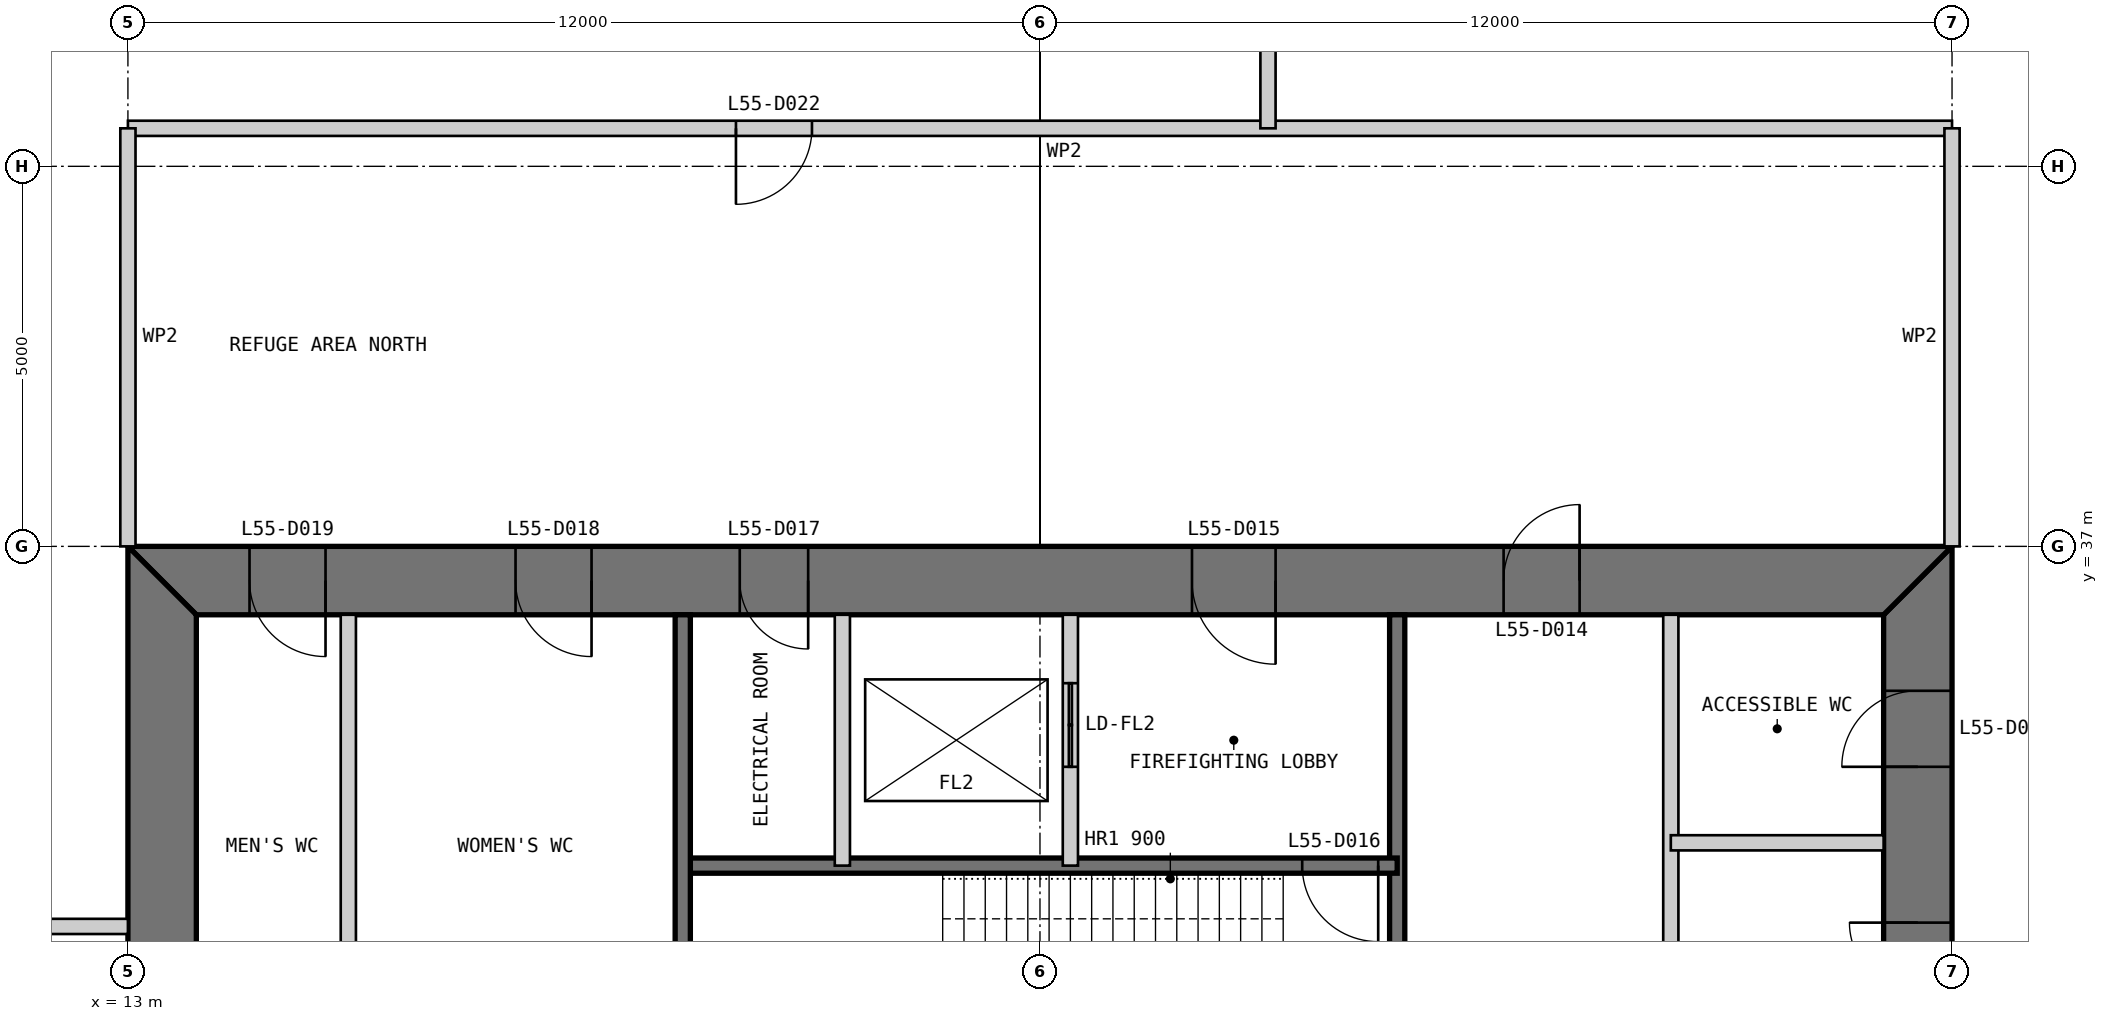
"""IFC4 building model, lengths in metres.
Left out: names, types, materials, properties, quantities, classifications, styles, units other than length and angle.
Written with IfcOpenShell. Run it as: python <this file> out.ifc"""

import sys

from ifc_helpers import new_model, si_unit, direction, frame, frame_2d, origin, place, context, subcontext, project, spatial, polyline, rectangle, outline, extrude, element, fill, save


model = new_model("IFC4")
c1 = context("Model", 3, precision=1e-05, world=origin(), true_north=direction((0.0, 1.0)))
c2 = subcontext(c1, "Body", "Model", "MODEL_VIEW")
j1 = project(units=[si_unit("LENGTHUNIT", "METRE"), si_unit("PLANEANGLEUNIT", "RADIAN")], contexts=[c1])
p1 = place(None, origin())
s1 = spatial("IfcSite", under=j1, at=p1, CompositionType="ELEMENT")
p2 = place(p1, origin())
s2 = spatial("IfcBuilding", under=s1, at=p2, CompositionType="ELEMENT")
p3 = place(p2, frame((0.0, 0.0, 233.8)))
s3 = spatial("IfcBuildingStorey", under=s2, at=p3, CompositionType="ELEMENT", Elevation=233.8)
p4 = place(p3, frame((36.55, 13.9, 0.0), z_axis=(0.0, 0.0, 1.0), x_axis=(0.0, 1.0, 0.0)))
e1 = element("IfcWall", 1, at=p4, inside=s3, PredefinedType="SHEAR", context=c2, shape_type="SweptSolid", body=[
    extrude(outline(polyline([(-0.9, -0.45), (23.1, -0.45), (22.2, 0.45), (0.0, 0.45), (-0.9, -0.45)])), origin(), (0.0, 0.0, 1.0), 6.0),
])
p5 = place(p4, frame((20.2, 0.0, 0.0)))
e2 = element("IfcOpeningElement", 2, at=p5, cuts=e1, PredefinedType="OPENING", context=c2, shape_type="SweptSolid", body=[
    extrude(rectangle(XDim=1.0, YDim=2.2, at=frame_2d((0.5, 1.1))), frame((0.0, 0.46, 0.0), z_axis=(0.0, -1.0, 0.0), x_axis=(1.0, 0.0, 0.0)), (0.0, 0.0, 1.0), 0.92),
])
p6 = place(p4, frame((17.25, 0.0, 0.0)))
e3 = element("IfcOpeningElement", 3, at=p6, cuts=e1, PredefinedType="OPENING", context=c2, shape_type="SweptSolid", body=[
    extrude(rectangle(XDim=0.9, YDim=2.2, at=frame_2d((0.45, 1.1))), frame((0.0, 0.46, 0.0), z_axis=(0.0, -1.0, 0.0), x_axis=(1.0, 0.0, 0.0)), (0.0, 0.0, 1.0), 0.92),
])
p7 = place(p3, frame((37.0, 36.55, 0.0), z_axis=(0.0, 0.0, 1.0), x_axis=(-1.0, 0.0, 0.0)))
e4 = element("IfcWall", 4, at=p7, inside=s3, PredefinedType="SHEAR", context=c2, shape_type="SweptSolid", body=[
    extrude(outline(polyline([(0.0, -0.45), (24.0, -0.45), (23.1, 0.45), (0.9, 0.45), (0.0, -0.45)])), origin(), (0.0, 0.0, 1.0), 6.0),
])
p8 = place(p7, frame((4.9, 0.0, 0.0)))
e5 = element("IfcOpeningElement", 5, at=p8, cuts=e4, PredefinedType="OPENING", context=c2, shape_type="SweptSolid", body=[
    extrude(rectangle(XDim=1.0, YDim=2.2, at=frame_2d((0.5, 1.1))), frame((0.0, 0.46, 0.0), z_axis=(0.0, -1.0, 0.0), x_axis=(1.0, 0.0, 0.0)), (0.0, 0.0, 1.0), 0.92),
])
p9 = place(p7, frame((8.9, 0.0, 0.0)))
e6 = element("IfcOpeningElement", 6, at=p9, cuts=e4, PredefinedType="OPENING", context=c2, shape_type="SweptSolid", body=[
    extrude(rectangle(XDim=1.1, YDim=2.2, at=frame_2d((0.55, 1.1))), frame((0.0, 0.46, 0.0), z_axis=(0.0, -1.0, 0.0), x_axis=(1.0, 0.0, 0.0)), (0.0, 0.0, 1.0), 0.92),
])
p10 = place(p7, frame((15.05, 0.0, 0.0)))
e7 = element("IfcOpeningElement", 7, at=p10, cuts=e4, PredefinedType="OPENING", context=c2, shape_type="SweptSolid", body=[
    extrude(rectangle(XDim=0.9, YDim=2.2, at=frame_2d((0.45, 1.1))), frame((0.0, 0.46, 0.0), z_axis=(0.0, -1.0, 0.0), x_axis=(1.0, 0.0, 0.0)), (0.0, 0.0, 1.0), 0.92),
])
p11 = place(p7, frame((17.9, 0.0, 0.0)))
e8 = element("IfcOpeningElement", 8, at=p11, cuts=e4, PredefinedType="OPENING", context=c2, shape_type="SweptSolid", body=[
    extrude(rectangle(XDim=1.0, YDim=2.2, at=frame_2d((0.5, 1.1))), frame((0.0, 0.46, 0.0), z_axis=(0.0, -1.0, 0.0), x_axis=(1.0, 0.0, 0.0)), (0.0, 0.0, 1.0), 0.92),
])
p12 = place(p7, frame((21.4, 0.0, 0.0)))
e9 = element("IfcOpeningElement", 9, at=p12, cuts=e4, PredefinedType="OPENING", context=c2, shape_type="SweptSolid", body=[
    extrude(rectangle(XDim=1.0, YDim=2.2, at=frame_2d((0.5, 1.1))), frame((0.0, 0.46, 0.0), z_axis=(0.0, -1.0, 0.0), x_axis=(1.0, 0.0, 0.0)), (0.0, 0.0, 1.0), 0.92),
])
p13 = place(p3, frame((13.45, 36.1, 0.0), z_axis=(0.0, 0.0, 1.0), x_axis=(0.0, -1.0, 0.0)))
e10 = element("IfcWall", 10, at=p13, inside=s3, PredefinedType="SHEAR", context=c2, shape_type="SweptSolid", body=[
    extrude(outline(polyline([(-0.9, -0.45), (23.1, -0.45), (22.2, 0.45), (0.0, 0.45), (-0.9, -0.45)])), origin(), (0.0, 0.0, 1.0), 6.0),
])
p14 = place(p13, frame((20.2, 0.0, 0.0)))
e11 = element("IfcOpeningElement", 11, at=p14, cuts=e10, PredefinedType="OPENING", context=c2, shape_type="SweptSolid", body=[
    extrude(rectangle(XDim=1.0, YDim=2.2, at=frame_2d((0.5, 1.1))), frame((0.0, 0.46, 0.0), z_axis=(0.0, -1.0, 0.0), x_axis=(1.0, 0.0, 0.0)), (0.0, 0.0, 1.0), 0.92),
])
p15 = place(p13, frame((17.25, 0.0, 0.0)))
e12 = element("IfcOpeningElement", 12, at=p15, cuts=e10, PredefinedType="OPENING", context=c2, shape_type="SweptSolid", body=[
    extrude(rectangle(XDim=0.9, YDim=2.2, at=frame_2d((0.45, 1.1))), frame((0.0, 0.46, 0.0), z_axis=(0.0, -1.0, 0.0), x_axis=(1.0, 0.0, 0.0)), (0.0, 0.0, 1.0), 0.92),
])
p16 = place(p3, frame((33.3, 36.1, 0.0), z_axis=(0.0, 0.0, 1.0), x_axis=(0.0, -1.0, 0.0)))
e13 = element("IfcWall", 13, at=p16, inside=s3, PredefinedType="PARTITIONING", context=c2, shape_type="SweptSolid", body=[
    extrude(rectangle(XDim=16.1, YDim=0.2, at=frame_2d((8.05, 0.0))), origin(), (0.0, 0.0, 1.0), 5.8),
])
p17 = place(p3, frame((29.7, 36.1, 0.0), z_axis=(0.0, 0.0, 1.0), x_axis=(0.0, -1.0, 0.0)))
e14 = element("IfcWall", 14, at=p17, inside=s3, PredefinedType="SOLIDWALL", context=c2, shape_type="SweptSolid", body=[
    extrude(rectangle(XDim=16.1, YDim=0.2, at=frame_2d((8.05, 0.0))), origin(), (0.0, 0.0, 1.0), 5.8),
])
p18 = place(p3, frame((29.7, 32.8, 0.0), z_axis=(0.0, 0.0, 1.0), x_axis=(-1.0, 0.0, 0.0)))
e15 = element("IfcWall", 15, at=p18, inside=s3, PredefinedType="SOLIDWALL", context=c2, shape_type="SweptSolid", body=[
    extrude(rectangle(XDim=9.4, YDim=0.2, at=frame_2d((4.7, 0.0))), origin(), (0.0, 0.0, 1.0), 5.8),
])
p19 = place(p18, frame((0.25, 0.0, 0.0)))
e16 = element("IfcOpeningElement", 16, at=p19, cuts=e15, PredefinedType="OPENING", context=c2, shape_type="SweptSolid", body=[
    extrude(rectangle(XDim=1.0, YDim=2.2, at=frame_2d((0.5, 1.1))), frame((0.0, 0.11, 0.0), z_axis=(0.0, -1.0, 0.0), x_axis=(1.0, 0.0, 0.0)), (0.0, 0.0, 1.0), 0.22),
])
p20 = place(p3, frame((25.4, 36.1, 0.0), z_axis=(0.0, 0.0, 1.0), x_axis=(0.0, -1.0, 0.0)))
e17 = element("IfcWall", 17, at=p20, inside=s3, PredefinedType="PARTITIONING", context=c2, shape_type="SweptSolid", body=[
    extrude(rectangle(XDim=3.3, YDim=0.2, at=frame_2d((1.65, 0.0))), origin(), (0.0, 0.0, 1.0), 5.8),
])
p21 = place(p20, frame((0.9, 0.0, 0.0)))
e18 = element("IfcOpeningElement", 18, at=p21, cuts=e17, PredefinedType="OPENING", context=c2, shape_type="SweptSolid", body=[
    extrude(rectangle(XDim=1.1, YDim=2.2, at=frame_2d((0.55, 1.1))), frame((0.0, 0.11, 0.0), z_axis=(0.0, -1.0, 0.0), x_axis=(1.0, 0.0, 0.0)), (0.0, 0.0, 1.0), 0.22),
])
p22 = place(p3, frame((22.4, 36.1, 0.0), z_axis=(0.0, 0.0, 1.0), x_axis=(0.0, -1.0, 0.0)))
e19 = element("IfcWall", 19, at=p22, inside=s3, PredefinedType="PARTITIONING", context=c2, shape_type="SweptSolid", body=[
    extrude(rectangle(XDim=3.3, YDim=0.2, at=frame_2d((1.65, 0.0))), origin(), (0.0, 0.0, 1.0), 5.8),
])
p23 = place(p3, frame((20.3, 36.1, 0.0), z_axis=(0.0, 0.0, 1.0), x_axis=(0.0, -1.0, 0.0)))
e20 = element("IfcWall", 20, at=p23, inside=s3, PredefinedType="SOLIDWALL", context=c2, shape_type="SweptSolid", body=[
    extrude(rectangle(XDim=6.1, YDim=0.2, at=frame_2d((3.05, 0.0))), origin(), (0.0, 0.0, 1.0), 5.8),
])
p24 = place(p3, frame((15.9, 36.1, 0.0), z_axis=(0.0, 0.0, 1.0), x_axis=(0.0, -1.0, 0.0)))
e21 = element("IfcWall", 21, at=p24, inside=s3, PredefinedType="PARTITIONING", context=c2, shape_type="SweptSolid", body=[
    extrude(rectangle(XDim=6.1, YDim=0.2, at=frame_2d((3.05, 0.0))), origin(), (0.0, 0.0, 1.0), 5.8),
])
p25 = place(p3, frame((36.1, 33.1, 0.0), z_axis=(0.0, 0.0, 1.0), x_axis=(-1.0, 0.0, 0.0)))
e22 = element("IfcWall", 22, at=p25, inside=s3, PredefinedType="PARTITIONING", context=c2, shape_type="SweptSolid", body=[
    extrude(rectangle(XDim=2.8, YDim=0.2, at=frame_2d((1.4, 0.0))), origin(), (0.0, 0.0, 1.0), 5.8),
])
p26 = place(p3, frame((13.0, 42.5, 0.0), z_axis=(0.0, 0.0, 1.0), x_axis=(1.0, 0.0, 0.0)))
e23 = element("IfcWall", 23, at=p26, inside=s3, PredefinedType="PARTITIONING", context=c2, shape_type="SweptSolid", body=[
    extrude(rectangle(XDim=24.0, YDim=0.2, at=frame_2d((12.0, 0.0))), origin(), (0.0, 0.0, 1.0), 5.8),
])
p27 = place(p26, frame((8.0, 0.0, 0.0)))
e24 = element("IfcOpeningElement", 24, at=p27, cuts=e23, PredefinedType="OPENING", context=c2, shape_type="SweptSolid", body=[
    extrude(rectangle(XDim=1.0, YDim=2.2, at=frame_2d((0.5, 1.1))), frame((0.0, 0.11, 0.0), z_axis=(0.0, -1.0, 0.0), x_axis=(1.0, 0.0, 0.0)), (0.0, 0.0, 1.0), 0.22),
])
for number, where, z_axis, x_axis in (
    (25, (37.0, 42.5, 0.0), (0.0, 0.0, 1.0), (0.0, -1.0, 0.0)),
    (26, (13.0, 37.0, 0.0), (0.0, 0.0, 1.0), (0.0, 1.0, 0.0)),
):
    element("IfcWall", number, at=place(p3, frame(where, z_axis=z_axis, x_axis=x_axis)), inside=s3, PredefinedType="PARTITIONING", context=c2, shape_type="SweptSolid", body=[
        extrude(rectangle(XDim=5.5, YDim=0.2, at=frame_2d((2.75, 0.0))), origin(), (0.0, 0.0, 1.0), 4.705),
    ])
p28 = place(p3, frame((28.0, 42.5, 0.0), z_axis=(0.0, 0.0, 1.0), x_axis=(0.0, 1.0, 0.0)))
e27 = element("IfcWall", 27, at=p28, inside=s3, PredefinedType="PARTITIONING", context=c2, shape_type="SweptSolid", body=[
    extrude(rectangle(XDim=5.5, YDim=0.2, at=frame_2d((2.75, 0.0))), origin(), (0.0, 0.0, 1.0), 4.954),
])
p29 = place(p28, frame((1.85, 0.0, 0.0)))
e28 = element("IfcOpeningElement", 28, at=p29, cuts=e27, PredefinedType="OPENING", context=c2, shape_type="SweptSolid", body=[
    extrude(rectangle(XDim=1.8, YDim=2.4, at=frame_2d((0.9, 1.2))), frame((0.0, 0.11, 0.0), z_axis=(0.0, -1.0, 0.0), x_axis=(1.0, 0.0, 0.0)), (0.0, 0.0, 1.0), 0.22),
])
p30 = place(p3, frame((2.0, 32.0, 0.0), z_axis=(0.0, 0.0, 1.0), x_axis=(1.0, 0.0, 0.0)))
e29 = element("IfcWall", 29, at=p30, inside=s3, PredefinedType="PARTITIONING", context=c2, shape_type="SweptSolid", body=[
    extrude(rectangle(XDim=11.0, YDim=0.2, at=frame_2d((5.5, 0.0))), origin(), (0.0, 0.0, 1.0), 5.8),
])
p31 = place(p30, frame((4.6, 0.0, 0.0)))
e30 = element("IfcOpeningElement", 30, at=p31, cuts=e29, PredefinedType="OPENING", context=c2, shape_type="SweptSolid", body=[
    extrude(rectangle(XDim=1.8, YDim=2.4, at=frame_2d((0.9, 1.2))), frame((0.0, 0.11, 0.0), z_axis=(0.0, -1.0, 0.0), x_axis=(1.0, 0.0, 0.0)), (0.0, 0.0, 1.0), 0.22),
])
p32 = place(p8, frame((1.0, 0.0, 0.0), z_axis=(0.0, 0.0, 1.0), x_axis=(-1.0, 0.0, 0.0)))
e31 = element("IfcDoor", 31, at=p32, inside=s3, OperationType="SINGLE_SWING_RIGHT", PredefinedType="DOOR", context=c2, shape_type="SweptSolid", body=[
    extrude(rectangle(XDim=1.0, YDim=2.2, at=frame_2d((0.5, 1.1))), frame((0.0, 0.025, 0.0), z_axis=(0.0, -1.0, 0.0), x_axis=(1.0, 0.0, 0.0)), (0.0, 0.0, 1.0), 0.05),
    extrude(outline(polyline([(0.0, 0.0), (0.04, 0.0), (0.04, 2.16), (0.96, 2.16), (0.96, 0.0), (1.0, 0.0), (1.0, 2.2), (0.0, 2.2), (0.0, 0.0)])), frame((0.0, 0.3, 0.0), z_axis=(0.0, -1.0, 0.0), x_axis=(1.0, 0.0, 0.0)), (0.0, 0.0, 1.0), 0.6),
])
fill(e5, e31)
p33 = place(p9, origin())
e32 = element("IfcDoor", 32, at=p33, inside=s3, OperationType="SINGLE_SWING_LEFT", PredefinedType="DOOR", context=c2, shape_type="SweptSolid", body=[
    extrude(rectangle(XDim=1.1, YDim=2.2, at=frame_2d((0.55, 1.1))), frame((0.0, 0.025, 0.0), z_axis=(0.0, -1.0, 0.0), x_axis=(1.0, 0.0, 0.0)), (0.0, 0.0, 1.0), 0.05),
    extrude(outline(polyline([(0.0, 0.0), (0.04, 0.0), (0.04, 2.16), (1.06, 2.16), (1.06, 0.0), (1.1, 0.0), (1.1, 2.2), (0.0, 2.2), (0.0, 0.0)])), frame((0.0, 0.3, 0.0), z_axis=(0.0, -1.0, 0.0), x_axis=(1.0, 0.0, 0.0)), (0.0, 0.0, 1.0), 0.6),
])
fill(e6, e32)
p34 = place(p19, origin())
e33 = element("IfcDoor", 33, at=p34, inside=s3, OperationType="SINGLE_SWING_LEFT", PredefinedType="DOOR", context=c2, shape_type="SweptSolid", body=[
    extrude(rectangle(XDim=1.0, YDim=2.2, at=frame_2d((0.5, 1.1))), frame((0.0, 0.025, 0.0), z_axis=(0.0, -1.0, 0.0), x_axis=(1.0, 0.0, 0.0)), (0.0, 0.0, 1.0), 0.05),
])
fill(e16, e33)
p35 = place(p10, origin())
e34 = element("IfcDoor", 34, at=p35, inside=s3, OperationType="SINGLE_SWING_LEFT", PredefinedType="DOOR", context=c2, shape_type="SweptSolid", body=[
    extrude(rectangle(XDim=0.9, YDim=2.2, at=frame_2d((0.45, 1.1))), frame((0.0, 0.025, 0.0), z_axis=(0.0, -1.0, 0.0), x_axis=(1.0, 0.0, 0.0)), (0.0, 0.0, 1.0), 0.05),
    extrude(outline(polyline([(0.0, 0.0), (0.04, 0.0), (0.04, 2.16), (0.86, 2.16), (0.86, 0.0), (0.9, 0.0), (0.9, 2.2), (0.0, 2.2), (0.0, 0.0)])), frame((0.0, 0.3, 0.0), z_axis=(0.0, -1.0, 0.0), x_axis=(1.0, 0.0, 0.0)), (0.0, 0.0, 1.0), 0.6),
])
fill(e7, e34)
p36 = place(p11, origin())
e35 = element("IfcDoor", 35, at=p36, inside=s3, OperationType="SINGLE_SWING_LEFT", PredefinedType="DOOR", context=c2, shape_type="SweptSolid", body=[
    extrude(rectangle(XDim=1.0, YDim=2.2, at=frame_2d((0.5, 1.1))), frame((0.0, 0.025, 0.0), z_axis=(0.0, -1.0, 0.0), x_axis=(1.0, 0.0, 0.0)), (0.0, 0.0, 1.0), 0.05),
    extrude(outline(polyline([(0.0, 0.0), (0.04, 0.0), (0.04, 2.16), (0.96, 2.16), (0.96, 0.0), (1.0, 0.0), (1.0, 2.2), (0.0, 2.2), (0.0, 0.0)])), frame((0.0, 0.3, 0.0), z_axis=(0.0, -1.0, 0.0), x_axis=(1.0, 0.0, 0.0)), (0.0, 0.0, 1.0), 0.6),
])
fill(e8, e35)
p37 = place(p12, origin())
e36 = element("IfcDoor", 36, at=p37, inside=s3, OperationType="SINGLE_SWING_LEFT", PredefinedType="DOOR", context=c2, shape_type="SweptSolid", body=[
    extrude(rectangle(XDim=1.0, YDim=2.2, at=frame_2d((0.5, 1.1))), frame((0.0, 0.025, 0.0), z_axis=(0.0, -1.0, 0.0), x_axis=(1.0, 0.0, 0.0)), (0.0, 0.0, 1.0), 0.05),
    extrude(outline(polyline([(0.0, 0.0), (0.04, 0.0), (0.04, 2.16), (0.96, 2.16), (0.96, 0.0), (1.0, 0.0), (1.0, 2.2), (0.0, 2.2), (0.0, 0.0)])), frame((0.0, 0.3, 0.0), z_axis=(0.0, -1.0, 0.0), x_axis=(1.0, 0.0, 0.0)), (0.0, 0.0, 1.0), 0.6),
])
fill(e9, e36)
p38 = place(p5, origin())
e37 = element("IfcDoor", 37, at=p38, inside=s3, OperationType="SINGLE_SWING_LEFT", PredefinedType="DOOR", context=c2, shape_type="SweptSolid", body=[
    extrude(rectangle(XDim=1.0, YDim=2.2, at=frame_2d((0.5, 1.1))), frame((0.0, 0.025, 0.0), z_axis=(0.0, -1.0, 0.0), x_axis=(1.0, 0.0, 0.0)), (0.0, 0.0, 1.0), 0.05),
    extrude(outline(polyline([(0.0, 0.0), (0.04, 0.0), (0.04, 2.16), (0.96, 2.16), (0.96, 0.0), (1.0, 0.0), (1.0, 2.2), (0.0, 2.2), (0.0, 0.0)])), frame((0.0, 0.3, 0.0), z_axis=(0.0, -1.0, 0.0), x_axis=(1.0, 0.0, 0.0)), (0.0, 0.0, 1.0), 0.6),
])
fill(e2, e37)
p39 = place(p6, origin())
e38 = element("IfcDoor", 38, at=p39, inside=s3, OperationType="SINGLE_SWING_RIGHT", PredefinedType="DOOR", context=c2, shape_type="SweptSolid", body=[
    extrude(rectangle(XDim=0.9, YDim=2.2, at=frame_2d((0.45, 1.1))), frame((0.0, 0.025, 0.0), z_axis=(0.0, -1.0, 0.0), x_axis=(1.0, 0.0, 0.0)), (0.0, 0.0, 1.0), 0.05),
    extrude(outline(polyline([(0.0, 0.0), (0.04, 0.0), (0.04, 2.16), (0.86, 2.16), (0.86, 0.0), (0.9, 0.0), (0.9, 2.2), (0.0, 2.2), (0.0, 0.0)])), frame((0.0, 0.3, 0.0), z_axis=(0.0, -1.0, 0.0), x_axis=(1.0, 0.0, 0.0)), (0.0, 0.0, 1.0), 0.6),
])
fill(e3, e38)
p40 = place(p27, frame((1.0, 0.0, 0.0), z_axis=(0.0, 0.0, 1.0), x_axis=(-1.0, 0.0, 0.0)))
e39 = element("IfcDoor", 39, at=p40, inside=s3, OperationType="SINGLE_SWING_RIGHT", PredefinedType="DOOR", context=c2, shape_type="SweptSolid", body=[
    extrude(rectangle(XDim=1.0, YDim=2.2, at=frame_2d((0.5, 1.1))), frame((0.0, 0.025, 0.0), z_axis=(0.0, -1.0, 0.0), x_axis=(1.0, 0.0, 0.0)), (0.0, 0.0, 1.0), 0.05),
])
fill(e24, e39)
p41 = place(p21, origin())
e40 = element("IfcDoor", 40, at=p41, inside=s3, OperationType="DOUBLE_DOOR_SLIDING", PredefinedType="DOOR", context=c2, shape_type="SweptSolid", body=[
    extrude(rectangle(XDim=1.1, YDim=2.2, at=frame_2d((0.55, 1.1))), frame((0.0, 0.025, 0.0), z_axis=(0.0, -1.0, 0.0), x_axis=(1.0, 0.0, 0.0)), (0.0, 0.0, 1.0), 0.05),
])
fill(e18, e40)
save(model, sys.argv[1])
